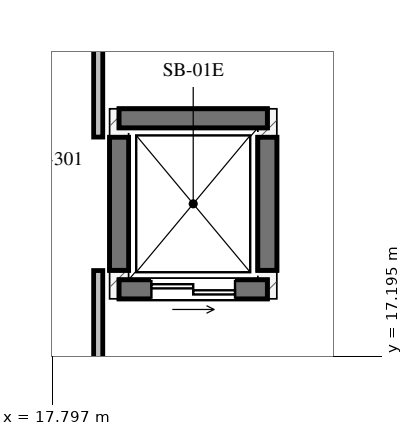
"""IFC4 building model, lengths in metres.
Left out: names, types, materials, properties, quantities, classifications, styles, units other than length and angle.
Written with IfcOpenShell. Run it as: python <this file> out.ifc"""

import sys

from ifc_helpers import new_model, si_unit, direction, frame, frame_2d, origin, place, context, subcontext, project, spatial, rectangle, extrude, element, fill, save


model = new_model("IFC4")
c1 = context("Model", 3, precision=1e-05, world=origin(), true_north=direction((0.0, 1.0)))
c2 = subcontext(c1, "Body", "Model", "MODEL_VIEW")
j1 = project(units=[si_unit("LENGTHUNIT", "METRE"), si_unit("PLANEANGLEUNIT", "RADIAN")], contexts=[c1])
p1 = place(None, origin())
s1 = spatial("IfcSite", under=j1, at=p1, CompositionType="ELEMENT")
p2 = place(p1, origin())
s2 = spatial("IfcBuilding", under=s1, at=p2, CompositionType="ELEMENT")
p3 = place(p2, frame((0.0, 0.0, 0.45)))
s3 = spatial("IfcBuildingStorey", under=s2, at=p3, CompositionType="ELEMENT", Elevation=0.45)
for number, where, z_axis, x_axis in (
    (1, (18.675, 18.075, -1.65), (0.0, 0.0, 1.0), (1.0, 0.0, 0.0)),
    (2, (18.675, 20.325, -1.65), (0.0, 0.0, 1.0), (1.0, 0.0, 0.0)),
):
    element("IfcWall", number, at=place(p3, frame(where, z_axis=z_axis, x_axis=x_axis)), inside=s3, PredefinedType="SHEAR", context=c2, shape_type="SweptSolid", body=[
        extrude(rectangle(XDim=1.95, YDim=0.25, at=frame_2d((0.975, 0.0))), origin(), (0.0, 0.0, 1.0), 1.65),
    ])
for number, where, z_axis, x_axis in (
    (3, (18.675, 18.325, -1.65), (0.0, 0.0, 1.0), (0.0, 1.0, 0.0)),
    (4, (20.625, 18.325, -1.65), (0.0, 0.0, 1.0), (0.0, 1.0, 0.0)),
):
    element("IfcWall", number, at=place(p3, frame(where, z_axis=z_axis, x_axis=x_axis)), inside=s3, PredefinedType="SHEAR", context=c2, shape_type="SweptSolid", body=[
        extrude(rectangle(XDim=1.75, YDim=0.25, at=frame_2d((0.875, 0.0))), origin(), (0.0, 0.0, 1.0), 1.65),
    ])
p4 = place(p3, frame((18.675, 18.075, 0.0), z_axis=(0.0, 0.0, 1.0), x_axis=(1.0, 0.0, 0.0)))
e5 = element("IfcWall", 5, at=p4, inside=s3, PredefinedType="SHEAR", context=c2, shape_type="SweptSolid", body=[
    extrude(rectangle(XDim=1.95, YDim=0.25, at=frame_2d((0.975, 0.0))), origin(), (0.0, 0.0, 1.0), 5.2),
])
p5 = place(p4, frame((0.425, 0.0, 0.0)))
e6 = element("IfcOpeningElement", 6, at=p5, cuts=e5, PredefinedType="OPENING", context=c2, shape_type="SweptSolid", body=[
    extrude(rectangle(XDim=1.1, YDim=2.15, at=frame_2d((0.55, 1.075))), frame((0.0, 0.135, 0.0), z_axis=(0.0, -1.0, 0.0), x_axis=(1.0, 0.0, 0.0)), (0.0, 0.0, 1.0), 0.27),
])
p6 = place(p3, frame((18.675, 20.325, 0.0), z_axis=(0.0, 0.0, 1.0), x_axis=(1.0, 0.0, 0.0)))
e7 = element("IfcWall", 7, at=p6, inside=s3, PredefinedType="SHEAR", context=c2, shape_type="SweptSolid", body=[
    extrude(rectangle(XDim=1.95, YDim=0.25, at=frame_2d((0.975, 0.0))), origin(), (0.0, 0.0, 1.0), 5.2),
])
for number, where, z_axis, x_axis in (
    (8, (18.675, 18.325, 0.0), (0.0, 0.0, 1.0), (0.0, 1.0, 0.0)),
    (9, (20.625, 18.325, 0.0), (0.0, 0.0, 1.0), (0.0, 1.0, 0.0)),
):
    element("IfcWall", number, at=place(p3, frame(where, z_axis=z_axis, x_axis=x_axis)), inside=s3, PredefinedType="SHEAR", context=c2, shape_type="SweptSolid", body=[
        extrude(rectangle(XDim=1.75, YDim=0.25, at=frame_2d((0.875, 0.0))), origin(), (0.0, 0.0, 1.0), 5.2),
    ])
p7 = place(p3, frame((18.4, 7.463, 0.0), z_axis=(0.0, 0.0, 1.0), x_axis=(0.0, 1.0, 0.0)))
e10 = element("IfcWall", 10, at=p7, inside=s3, PredefinedType="PARTITIONING", context=c2, shape_type="SweptSolid", body=[
    extrude(rectangle(XDim=10.859, YDim=0.12, at=frame_2d((5.43, 0.0))), origin(), (0.0, 0.0, 1.0), 5.2),
])
p8 = place(p3, frame((18.4, 20.078, 0.0), z_axis=(0.0, 0.0, 1.0), x_axis=(0.0, 1.0, 0.0)))
e11 = element("IfcWall", 11, at=p8, inside=s3, PredefinedType="PARTITIONING", context=c2, shape_type="SweptSolid", body=[
    extrude(rectangle(XDim=1.959, YDim=0.12, at=frame_2d((0.979, 0.0))), origin(), (0.0, 0.0, 1.0), 5.2),
])
p9 = place(p5, origin())
e12 = element("IfcDoor", 12, at=p9, inside=s3, OperationType="DOUBLE_DOOR_SLIDING", PredefinedType="DOOR", context=c2, shape_type="SweptSolid", body=[
    extrude(rectangle(XDim=1.1, YDim=2.15, at=frame_2d((0.55, 1.075))), frame((0.0, 0.025, 0.0), z_axis=(0.0, -1.0, 0.0), x_axis=(1.0, 0.0, 0.0)), (0.0, 0.0, 1.0), 0.05),
])
fill(e6, e12)
save(model, sys.argv[1])
